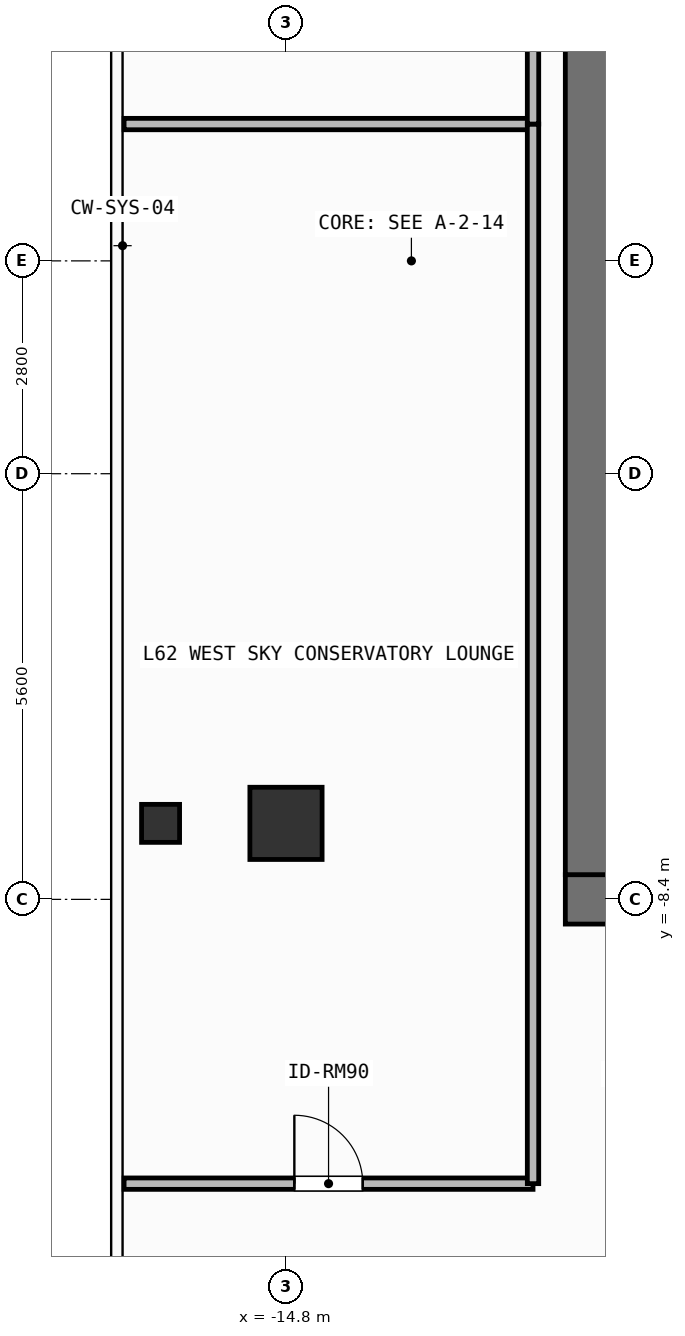
"""IFC4 building model, lengths in metres.
Left out: names, types, materials, properties, quantities, classifications, styles, units other than length and angle.
Written with IfcOpenShell. Run it as: python <this file> out.ifc"""

import sys

from ifc_helpers import new_model, si_unit, direction, frame, frame_2d, origin, origin_2d, place, context, subcontext, project, spatial, rectangle, hollow_rectangle, extrude, element, fill, save


model = new_model("IFC4")
c1 = context("Model", 3, precision=1e-05, world=origin(), true_north=direction((0.0, 1.0)))
c2 = subcontext(c1, "Body", "Model", "MODEL_VIEW")
j1 = project(units=[si_unit("LENGTHUNIT", "METRE"), si_unit("PLANEANGLEUNIT", "RADIAN")], contexts=[c1])
p1 = place(None, origin())
s1 = spatial("IfcSite", under=j1, at=p1, CompositionType="ELEMENT")
p2 = place(p1, origin())
s2 = spatial("IfcBuilding", under=s1, at=p2, CompositionType="ELEMENT")
p3 = place(p2, frame((0.0, 0.0, 254.7)))
s3 = spatial("IfcBuildingStorey", under=s2, at=p3, CompositionType="ELEMENT", Elevation=254.7)
p4 = place(p3, frame((-11.125, -8.4, 0.0), z_axis=(0.0, 0.0, 1.0), x_axis=(1.0, 0.0, 0.0)))
e1 = element("IfcWall", 1, at=p4, inside=s3, PredefinedType="SHEAR", context=c2, shape_type="SweptSolid", body=[
    extrude(rectangle(XDim=1.425, YDim=0.65, at=frame_2d((0.712, 0.0))), origin(), (0.0, 0.0, 1.0), 3.9),
])
p5 = place(p3, frame((-10.8, -8.075, 0.0), z_axis=(0.0, 0.0, 1.0), x_axis=(0.0, 1.0, 0.0)))
e2 = element("IfcWall", 2, at=p5, inside=s3, PredefinedType="SHEAR", context=c2, shape_type="SweptSolid", body=[
    extrude(rectangle(XDim=16.15, YDim=0.65, at=frame_2d((8.075, 0.0))), origin(), (0.0, 0.0, 1.0), 3.9),
])
p6 = place(p3, frame((-14.8, -7.4, 0.0), z_axis=(0.0, 0.0, 1.0), x_axis=(1.0, 0.0, 0.0)))
e3 = element("IfcColumn", 3, at=p6, inside=s3, PredefinedType="COLUMN", context=c2, shape_type="SweptSolid", body=[
    extrude(rectangle(XDim=0.95, YDim=0.95, at=origin_2d()), origin(), (0.0, 0.0, 1.0), 3.9),
])
p7 = place(p3, frame((-16.45, -7.4, 0.0), z_axis=(0.0, 0.0, 1.0), x_axis=(1.0, 0.0, 0.0)))
e4 = element("IfcColumn", 4, at=p7, inside=s3, PredefinedType="COLUMN", context=c2, shape_type="SweptSolid", body=[
    extrude(hollow_rectangle(XDim=0.5, YDim=0.5, WallThickness=0.025, at=origin_2d()), origin(), (0.0, 0.0, 1.0), 3.9),
])
p8 = place(p3, frame((-16.93, -12.14, 0.0), z_axis=(0.0, 0.0, 1.0), x_axis=(1.0, 0.0, 0.0)))
e5 = element("IfcWall", 5, at=p8, inside=s3, PredefinedType="PARTITIONING", context=c2, shape_type="SweptSolid", body=[
    extrude(rectangle(XDim=5.38, YDim=0.15, at=frame_2d((2.69, 0.0))), origin(), (0.0, 0.0, 1.0), 3.68),
])
p9 = place(p8, frame((2.24, 0.0, 0.0)))
e6 = element("IfcOpeningElement", 6, at=p9, cuts=e5, PredefinedType="OPENING", context=c2, shape_type="SweptSolid", body=[
    extrude(rectangle(XDim=0.9, YDim=2.1, at=frame_2d((0.45, 1.05))), frame((0.0, 0.085, 0.0), z_axis=(0.0, -1.0, 0.0), x_axis=(1.0, 0.0, 0.0)), (0.0, 0.0, 1.0), 0.17),
])
p10 = place(p3, frame((-16.93, 1.8, 0.0), z_axis=(0.0, 0.0, 1.0), x_axis=(1.0, 0.0, 0.0)))
e7 = element("IfcWall", 7, at=p10, inside=s3, PredefinedType="PARTITIONING", context=c2, shape_type="SweptSolid", body=[
    extrude(rectangle(XDim=5.38, YDim=0.15, at=frame_2d((2.69, 0.0))), origin(), (0.0, 0.0, 1.0), 3.68),
])
p11 = place(p3, frame((-11.55, -12.14, 0.0), z_axis=(0.0, 0.0, 1.0), x_axis=(0.0, 1.0, 0.0)))
e8 = element("IfcWall", 8, at=p11, inside=s3, PredefinedType="PARTITIONING", context=c2, shape_type="SweptSolid", body=[
    extrude(rectangle(XDim=13.94, YDim=0.15, at=frame_2d((6.97, 0.0))), origin(), (0.0, 0.0, 1.0), 3.68),
])
p12 = place(p3, frame((-11.55, 1.8, 0.0), z_axis=(0.0, 0.0, 1.0), x_axis=(0.0, 1.0, 0.0)))
e9 = element("IfcWall", 9, at=p12, inside=s3, PredefinedType="PARTITIONING", context=c2, shape_type="SweptSolid", body=[
    extrude(rectangle(XDim=10.34, YDim=0.15, at=frame_2d((5.17, 0.0))), origin(), (0.0, 0.0, 1.0), 3.68),
])
p13 = place(p9, origin())
e10 = element("IfcDoor", 10, at=p13, inside=s3, OperationType="SINGLE_SWING_LEFT", PredefinedType="DOOR", context=c2, shape_type="SweptSolid", body=[
    extrude(rectangle(XDim=0.9, YDim=2.1, at=frame_2d((0.45, 1.05))), frame((0.0, 0.025, 0.0), z_axis=(0.0, -1.0, 0.0), x_axis=(1.0, 0.0, 0.0)), (0.0, 0.0, 1.0), 0.05),
])
fill(e6, e10)
save(model, sys.argv[1])
